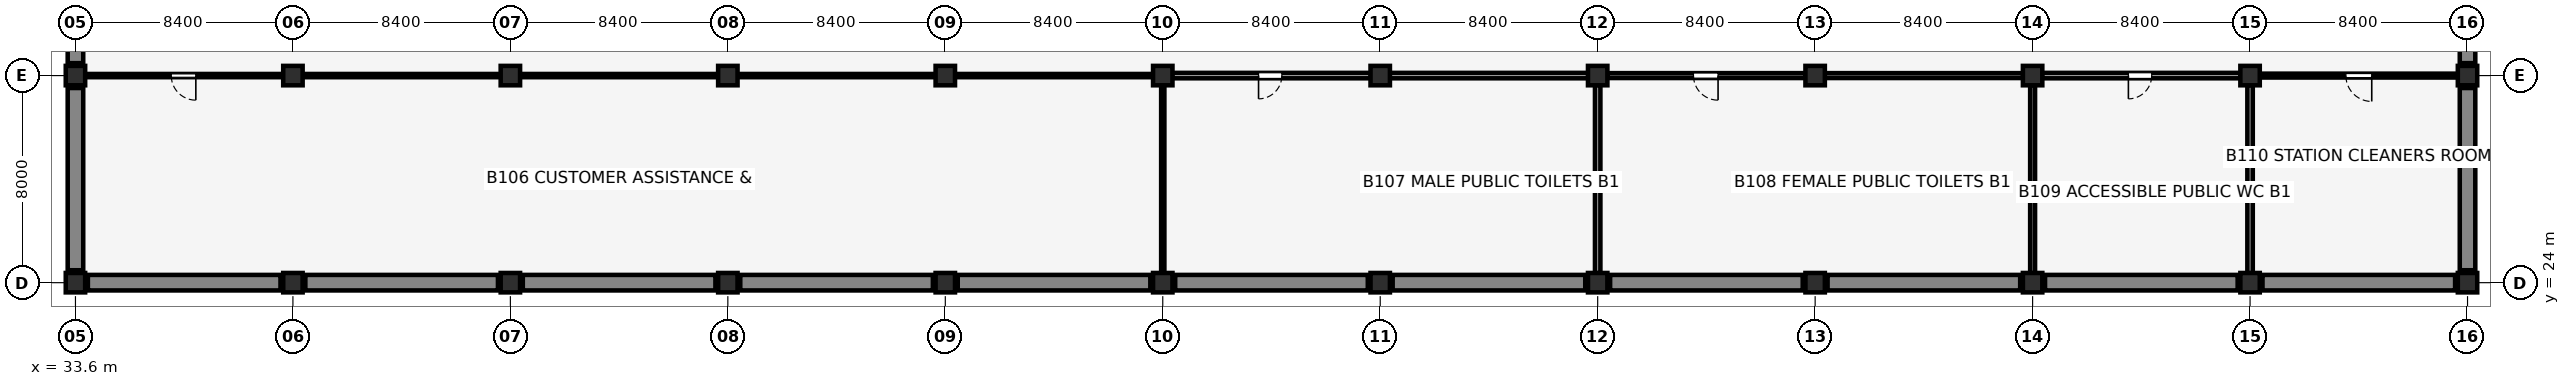
"""IFC4 building model, lengths in metres.
Left out: names, types, materials, properties, quantities, classifications, styles, units other than length and angle.
Written with IfcOpenShell. Run it as: python <this file> out.ifc"""

import sys

from ifc_helpers import new_model, si_unit, direction, frame, frame_2d, origin, origin_2d, place, context, subcontext, project, spatial, rectangle, extrude, element, fill, save


model = new_model("IFC4")
c1 = context("Model", 3, precision=1e-05, world=origin(), true_north=direction((0.0, 1.0)))
c2 = subcontext(c1, "Body", "Model", "MODEL_VIEW")
j1 = project(units=[si_unit("LENGTHUNIT", "METRE"), si_unit("PLANEANGLEUNIT", "RADIAN")], contexts=[c1])
p1 = place(None, origin())
s1 = spatial("IfcSite", under=j1, at=p1, CompositionType="ELEMENT")
p2 = place(p1, origin())
s2 = spatial("IfcBuilding", under=s1, at=p2, CompositionType="ELEMENT")
p3 = place(p2, frame((0.0, 0.0, -5.44)))
s3 = spatial("IfcBuildingStorey", under=s2, at=p3, CompositionType="ELEMENT", Elevation=-5.44)
for number, where, z_axis, x_axis in (
    (1, (34.08, 24.0, 0.0), (0.0, 0.0, 1.0), (1.0, 0.0, 0.0)),
    (2, (42.48, 24.0, 0.0), (0.0, 0.0, 1.0), (1.0, 0.0, 0.0)),
):
    element("IfcWall", number, at=place(p3, frame(where, z_axis=z_axis, x_axis=x_axis)), inside=s3, PredefinedType="SOLIDWALL", context=c2, shape_type="SweptSolid", body=[
        extrude(rectangle(XDim=7.44, YDim=0.6, at=frame_2d((3.72, 0.0))), origin(), (0.0, 0.0, 1.0), 5.02),
    ])
p4 = place(p3, frame((50.88, 24.0, 0.0), z_axis=(0.0, 0.0, 1.0), x_axis=(1.0, 0.0, 0.0)))
e3 = element("IfcWall", 3, at=p4, inside=s3, PredefinedType="SOLIDWALL", context=c2, shape_type="SweptSolid", body=[
    extrude(rectangle(XDim=7.44, YDim=0.6, at=frame_2d((3.72, 0.0))), origin(), (0.0, 0.0, 1.0), 5.02),
])
p5 = place(p3, frame((59.28, 24.0, 0.0), z_axis=(0.0, 0.0, 1.0), x_axis=(1.0, 0.0, 0.0)))
e4 = element("IfcWall", 4, at=p5, inside=s3, PredefinedType="SOLIDWALL", context=c2, shape_type="SweptSolid", body=[
    extrude(rectangle(XDim=7.44, YDim=0.6, at=frame_2d((3.72, 0.0))), origin(), (0.0, 0.0, 1.0), 5.02),
])
p6 = place(p3, frame((67.68, 24.0, 0.0), z_axis=(0.0, 0.0, 1.0), x_axis=(1.0, 0.0, 0.0)))
e5 = element("IfcWall", 5, at=p6, inside=s3, PredefinedType="SOLIDWALL", context=c2, shape_type="SweptSolid", body=[
    extrude(rectangle(XDim=7.44, YDim=0.6, at=frame_2d((3.72, 0.0))), origin(), (0.0, 0.0, 1.0), 5.02),
])
for number, where, z_axis, x_axis in (
    (6, (76.08, 24.0, 0.0), (0.0, 0.0, 1.0), (1.0, 0.0, 0.0)),
    (7, (84.48, 24.0, 0.0), (0.0, 0.0, 1.0), (1.0, 0.0, 0.0)),
):
    element("IfcWall", number, at=place(p3, frame(where, z_axis=z_axis, x_axis=x_axis)), inside=s3, PredefinedType="SOLIDWALL", context=c2, shape_type="SweptSolid", body=[
        extrude(rectangle(XDim=7.44, YDim=0.6, at=frame_2d((3.72, 0.0))), origin(), (0.0, 0.0, 1.0), 5.02),
    ])
p7 = place(p3, frame((92.88, 24.0, 0.0), z_axis=(0.0, 0.0, 1.0), x_axis=(1.0, 0.0, 0.0)))
e8 = element("IfcWall", 8, at=p7, inside=s3, PredefinedType="SOLIDWALL", context=c2, shape_type="SweptSolid", body=[
    extrude(rectangle(XDim=7.44, YDim=0.6, at=frame_2d((3.72, 0.0))), origin(), (0.0, 0.0, 1.0), 5.02),
])
p8 = place(p3, frame((101.28, 24.0, 0.0), z_axis=(0.0, 0.0, 1.0), x_axis=(1.0, 0.0, 0.0)))
e9 = element("IfcWall", 9, at=p8, inside=s3, PredefinedType="SOLIDWALL", context=c2, shape_type="SweptSolid", body=[
    extrude(rectangle(XDim=7.44, YDim=0.6, at=frame_2d((3.72, 0.0))), origin(), (0.0, 0.0, 1.0), 5.02),
])
p9 = place(p3, frame((109.68, 24.0, 0.0), z_axis=(0.0, 0.0, 1.0), x_axis=(1.0, 0.0, 0.0)))
e10 = element("IfcWall", 10, at=p9, inside=s3, PredefinedType="SOLIDWALL", context=c2, shape_type="SweptSolid", body=[
    extrude(rectangle(XDim=7.44, YDim=0.6, at=frame_2d((3.72, 0.0))), origin(), (0.0, 0.0, 1.0), 5.02),
])
p10 = place(p3, frame((118.08, 24.0, 0.0), z_axis=(0.0, 0.0, 1.0), x_axis=(1.0, 0.0, 0.0)))
e11 = element("IfcWall", 11, at=p10, inside=s3, PredefinedType="SOLIDWALL", context=c2, shape_type="SweptSolid", body=[
    extrude(rectangle(XDim=7.44, YDim=0.6, at=frame_2d((3.72, 0.0))), origin(), (0.0, 0.0, 1.0), 5.02),
])
for number, where, z_axis, x_axis in (
    (12, (33.6, 24.48, 0.0), (0.0, 0.0, 1.0), (0.0, 1.0, 0.0)),
    (13, (33.6, 32.48, 0.0), (0.0, 0.0, 1.0), (0.0, 1.0, 0.0)),
    (14, (126.0, 24.48, 0.0), (0.0, 0.0, 1.0), (0.0, 1.0, 0.0)),
    (15, (126.0, 32.48, 0.0), (0.0, 0.0, 1.0), (0.0, 1.0, 0.0)),
):
    element("IfcWall", number, at=place(p3, frame(where, z_axis=z_axis, x_axis=x_axis)), inside=s3, PredefinedType="SOLIDWALL", context=c2, shape_type="SweptSolid", body=[
        extrude(rectangle(XDim=7.04, YDim=0.6, at=frame_2d((3.52, 0.0))), origin(), (0.0, 0.0, 1.0), 5.02),
    ])
for number, where, z_axis, x_axis in (
    (16, (33.6, 24.0, 0.0), (0.0, 0.0, 1.0), (1.0, 0.0, 0.0)),
    (17, (33.6, 32.0, 0.0), (0.0, 0.0, 1.0), (1.0, 0.0, 0.0)),
    (18, (42.0, 24.0, 0.0), (0.0, 0.0, 1.0), (1.0, 0.0, 0.0)),
    (19, (42.0, 32.0, 0.0), (0.0, 0.0, 1.0), (1.0, 0.0, 0.0)),
    (20, (50.4, 24.0, 0.0), (0.0, 0.0, 1.0), (1.0, 0.0, 0.0)),
    (21, (50.4, 32.0, 0.0), (0.0, 0.0, 1.0), (1.0, 0.0, 0.0)),
    (22, (58.8, 24.0, 0.0), (0.0, 0.0, 1.0), (1.0, 0.0, 0.0)),
    (23, (58.8, 32.0, 0.0), (0.0, 0.0, 1.0), (1.0, 0.0, 0.0)),
    (24, (67.2, 24.0, 0.0), (0.0, 0.0, 1.0), (1.0, 0.0, 0.0)),
    (25, (67.2, 32.0, 0.0), (0.0, 0.0, 1.0), (1.0, 0.0, 0.0)),
    (26, (75.6, 24.0, 0.0), (0.0, 0.0, 1.0), (1.0, 0.0, 0.0)),
    (27, (75.6, 32.0, 0.0), (0.0, 0.0, 1.0), (1.0, 0.0, 0.0)),
    (28, (84.0, 24.0, 0.0), (0.0, 0.0, 1.0), (1.0, 0.0, 0.0)),
    (29, (84.0, 32.0, 0.0), (0.0, 0.0, 1.0), (1.0, 0.0, 0.0)),
    (30, (92.4, 24.0, 0.0), (0.0, 0.0, 1.0), (1.0, 0.0, 0.0)),
    (31, (92.4, 32.0, 0.0), (0.0, 0.0, 1.0), (1.0, 0.0, 0.0)),
    (32, (100.8, 24.0, 0.0), (0.0, 0.0, 1.0), (1.0, 0.0, 0.0)),
    (33, (100.8, 32.0, 0.0), (0.0, 0.0, 1.0), (1.0, 0.0, 0.0)),
    (34, (109.2, 24.0, 0.0), (0.0, 0.0, 1.0), (1.0, 0.0, 0.0)),
    (35, (109.2, 32.0, 0.0), (0.0, 0.0, 1.0), (1.0, 0.0, 0.0)),
    (36, (117.6, 24.0, 0.0), (0.0, 0.0, 1.0), (1.0, 0.0, 0.0)),
    (37, (117.6, 32.0, 0.0), (0.0, 0.0, 1.0), (1.0, 0.0, 0.0)),
    (38, (126.0, 24.0, 0.0), (0.0, 0.0, 1.0), (1.0, 0.0, 0.0)),
    (39, (126.0, 32.0, 0.0), (0.0, 0.0, 1.0), (1.0, 0.0, 0.0)),
):
    element("IfcColumn", number, at=place(p3, frame(where, z_axis=z_axis, x_axis=x_axis)), inside=s3, PredefinedType="COLUMN", context=c2, shape_type="SweptSolid", body=[
        extrude(rectangle(XDim=0.75, YDim=0.75, at=origin_2d()), origin(), (0.0, 0.0, 1.0), 5.02),
    ])
p11 = place(p3, frame((33.965, 32.0, 0.0), z_axis=(0.0, 0.0, 1.0), x_axis=(1.0, 0.0, 0.0)))
e40 = element("IfcWall", 40, at=p11, inside=s3, PredefinedType="PARTITIONING", context=c2, shape_type="SweptSolid", body=[
    extrude(rectangle(XDim=7.67, YDim=0.125, at=frame_2d((3.835, 0.0))), origin(), (0.0, 0.0, 1.0), 4.07),
])
p12 = place(p11, frame((4.285, 0.0, 0.0), z_axis=(0.0, 0.0, 1.0), x_axis=(-1.0, 0.0, 0.0)))
e41 = element("IfcOpeningElement", 41, at=p12, cuts=e40, PredefinedType="OPENING", context=c2, shape_type="SweptSolid", body=[
    extrude(rectangle(XDim=0.95, YDim=2.15, at=frame_2d((0.475, 1.075))), frame((0.0, 0.073, 0.0), z_axis=(0.0, -1.0, 0.0), x_axis=(1.0, 0.0, 0.0)), (0.0, 0.0, 1.0), 0.145),
])
p13 = place(p3, frame((75.965, 32.0, 0.0), z_axis=(0.0, 0.0, 1.0), x_axis=(1.0, 0.0, 0.0)))
e42 = element("IfcWall", 42, at=p13, inside=s3, PredefinedType="PLUMBINGWALL", context=c2, shape_type="SweptSolid", body=[
    extrude(rectangle(XDim=7.67, YDim=0.21, at=frame_2d((3.835, 0.0))), origin(), (0.0, 0.0, 1.0), 4.07),
])
p14 = place(p13, frame((4.235, 0.0, 0.0), z_axis=(0.0, 0.0, 1.0), x_axis=(-1.0, 0.0, 0.0)))
e43 = element("IfcOpeningElement", 43, at=p14, cuts=e42, PredefinedType="OPENING", context=c2, shape_type="SweptSolid", body=[
    extrude(rectangle(XDim=0.9, YDim=2.15, at=frame_2d((0.45, 1.075))), frame((0.0, 0.115, 0.0), z_axis=(0.0, -1.0, 0.0), x_axis=(1.0, 0.0, 0.0)), (0.0, 0.0, 1.0), 0.23),
])
p15 = place(p3, frame((92.765, 32.0, 0.0), z_axis=(0.0, 0.0, 1.0), x_axis=(1.0, 0.0, 0.0)))
e44 = element("IfcWall", 44, at=p15, inside=s3, PredefinedType="PLUMBINGWALL", context=c2, shape_type="SweptSolid", body=[
    extrude(rectangle(XDim=7.67, YDim=0.19, at=frame_2d((3.835, 0.0))), origin(), (0.0, 0.0, 1.0), 4.07),
])
p16 = place(p15, frame((4.285, 0.0, 0.0), z_axis=(0.0, 0.0, 1.0), x_axis=(-1.0, 0.0, 0.0)))
e45 = element("IfcOpeningElement", 45, at=p16, cuts=e44, PredefinedType="OPENING", context=c2, shape_type="SweptSolid", body=[
    extrude(rectangle(XDim=0.95, YDim=2.15, at=frame_2d((0.475, 1.075))), frame((0.0, 0.105, 0.0), z_axis=(0.0, -1.0, 0.0), x_axis=(1.0, 0.0, 0.0)), (0.0, 0.0, 1.0), 0.21),
])
p17 = place(p3, frame((109.565, 32.0, 0.0), z_axis=(0.0, 0.0, 1.0), x_axis=(1.0, 0.0, 0.0)))
e46 = element("IfcWall", 46, at=p17, inside=s3, PredefinedType="PLUMBINGWALL", context=c2, shape_type="SweptSolid", body=[
    extrude(rectangle(XDim=7.67, YDim=0.21, at=frame_2d((3.835, 0.0))), origin(), (0.0, 0.0, 1.0), 4.07),
])
p18 = place(p17, frame((4.235, 0.0, 0.0), z_axis=(0.0, 0.0, 1.0), x_axis=(-1.0, 0.0, 0.0)))
e47 = element("IfcOpeningElement", 47, at=p18, cuts=e46, PredefinedType="OPENING", context=c2, shape_type="SweptSolid", body=[
    extrude(rectangle(XDim=0.9, YDim=2.15, at=frame_2d((0.45, 1.075))), frame((0.0, 0.115, 0.0), z_axis=(0.0, -1.0, 0.0), x_axis=(1.0, 0.0, 0.0)), (0.0, 0.0, 1.0), 0.23),
])
p19 = place(p3, frame((117.965, 32.0, 0.0), z_axis=(0.0, 0.0, 1.0), x_axis=(1.0, 0.0, 0.0)))
e48 = element("IfcWall", 48, at=p19, inside=s3, PredefinedType="PARTITIONING", context=c2, shape_type="SweptSolid", body=[
    extrude(rectangle(XDim=7.67, YDim=0.15, at=frame_2d((3.835, 0.0))), origin(), (0.0, 0.0, 1.0), 4.07),
])
p20 = place(p19, frame((4.335, 0.0, 0.0), z_axis=(0.0, 0.0, 1.0), x_axis=(-1.0, 0.0, 0.0)))
e49 = element("IfcOpeningElement", 49, at=p20, cuts=e48, PredefinedType="OPENING", context=c2, shape_type="SweptSolid", body=[
    extrude(rectangle(XDim=1.0, YDim=2.15, at=frame_2d((0.5, 1.075))), frame((0.0, 0.085, 0.0), z_axis=(0.0, -1.0, 0.0), x_axis=(1.0, 0.0, 0.0)), (0.0, 0.0, 1.0), 0.17),
])
p21 = place(p3, frame((42.365, 32.0, 0.0), z_axis=(0.0, 0.0, 1.0), x_axis=(1.0, 0.0, 0.0)))
e50 = element("IfcWall", 50, at=p21, inside=s3, PredefinedType="PARTITIONING", context=c2, shape_type="SweptSolid", body=[
    extrude(rectangle(XDim=7.67, YDim=0.125, at=frame_2d((3.835, 0.0))), origin(), (0.0, 0.0, 1.0), 4.07),
])
p22 = place(p3, frame((50.765, 32.0, 0.0), z_axis=(0.0, 0.0, 1.0), x_axis=(1.0, 0.0, 0.0)))
e51 = element("IfcWall", 51, at=p22, inside=s3, PredefinedType="PARTITIONING", context=c2, shape_type="SweptSolid", body=[
    extrude(rectangle(XDim=7.67, YDim=0.125, at=frame_2d((3.835, 0.0))), origin(), (0.0, 0.0, 1.0), 4.07),
])
p23 = place(p3, frame((59.165, 32.0, 0.0), z_axis=(0.0, 0.0, 1.0), x_axis=(1.0, 0.0, 0.0)))
e52 = element("IfcWall", 52, at=p23, inside=s3, PredefinedType="PARTITIONING", context=c2, shape_type="SweptSolid", body=[
    extrude(rectangle(XDim=7.67, YDim=0.125, at=frame_2d((3.835, 0.0))), origin(), (0.0, 0.0, 1.0), 4.07),
])
p24 = place(p3, frame((67.565, 32.0, 0.0), z_axis=(0.0, 0.0, 1.0), x_axis=(1.0, 0.0, 0.0)))
e53 = element("IfcWall", 53, at=p24, inside=s3, PredefinedType="PARTITIONING", context=c2, shape_type="SweptSolid", body=[
    extrude(rectangle(XDim=7.67, YDim=0.125, at=frame_2d((3.835, 0.0))), origin(), (0.0, 0.0, 1.0), 4.07),
])
p25 = place(p3, frame((75.6, 24.365, 0.0), z_axis=(0.0, 0.0, 1.0), x_axis=(0.0, 1.0, 0.0)))
e54 = element("IfcWall", 54, at=p25, inside=s3, PredefinedType="PARTITIONING", context=c2, shape_type="SweptSolid", body=[
    extrude(rectangle(XDim=7.27, YDim=0.125, at=frame_2d((3.635, 0.0))), origin(), (0.0, 0.0, 1.0), 4.37),
])
p26 = place(p3, frame((84.365, 32.0, 0.0), z_axis=(0.0, 0.0, 1.0), x_axis=(1.0, 0.0, 0.0)))
e55 = element("IfcWall", 55, at=p26, inside=s3, PredefinedType="PLUMBINGWALL", context=c2, shape_type="SweptSolid", body=[
    extrude(rectangle(XDim=7.67, YDim=0.21, at=frame_2d((3.835, 0.0))), origin(), (0.0, 0.0, 1.0), 4.07),
])
p27 = place(p3, frame((92.4, 24.365, 0.0), z_axis=(0.0, 0.0, 1.0), x_axis=(0.0, 1.0, 0.0)))
e56 = element("IfcWall", 56, at=p27, inside=s3, PredefinedType="PLUMBINGWALL", context=c2, shape_type="SweptSolid", body=[
    extrude(rectangle(XDim=7.27, YDim=0.21, at=frame_2d((3.635, 0.0))), origin(), (0.0, 0.0, 1.0), 4.37),
])
p28 = place(p3, frame((101.165, 32.0, 0.0), z_axis=(0.0, 0.0, 1.0), x_axis=(1.0, 0.0, 0.0)))
e57 = element("IfcWall", 57, at=p28, inside=s3, PredefinedType="PLUMBINGWALL", context=c2, shape_type="SweptSolid", body=[
    extrude(rectangle(XDim=7.67, YDim=0.19, at=frame_2d((3.835, 0.0))), origin(), (0.0, 0.0, 1.0), 4.07),
])
p29 = place(p3, frame((109.2, 24.365, 0.0), z_axis=(0.0, 0.0, 1.0), x_axis=(0.0, 1.0, 0.0)))
e58 = element("IfcWall", 58, at=p29, inside=s3, PredefinedType="PLUMBINGWALL", context=c2, shape_type="SweptSolid", body=[
    extrude(rectangle(XDim=7.27, YDim=0.19, at=frame_2d((3.635, 0.0))), origin(), (0.0, 0.0, 1.0), 4.37),
])
p30 = place(p3, frame((117.6, 24.365, 0.0), z_axis=(0.0, 0.0, 1.0), x_axis=(0.0, 1.0, 0.0)))
e59 = element("IfcWall", 59, at=p30, inside=s3, PredefinedType="PLUMBINGWALL", context=c2, shape_type="SweptSolid", body=[
    extrude(rectangle(XDim=7.27, YDim=0.21, at=frame_2d((3.635, 0.0))), origin(), (0.0, 0.0, 1.0), 4.37),
])
p31 = place(p12, origin())
e60 = element("IfcDoor", 60, at=p31, inside=s3, OperationType="SINGLE_SWING_LEFT", PredefinedType="DOOR", context=c2, shape_type="SweptSolid", body=[
    extrude(rectangle(XDim=0.95, YDim=2.15, at=frame_2d((0.475, 1.075))), frame((0.0, 0.025, 0.0), z_axis=(0.0, -1.0, 0.0), x_axis=(1.0, 0.0, 0.0)), (0.0, 0.0, 1.0), 0.05),
])
fill(e41, e60)
p32 = place(p14, origin())
e61 = element("IfcDoor", 61, at=p32, inside=s3, OperationType="SINGLE_SWING_RIGHT", PredefinedType="DOOR", context=c2, shape_type="SweptSolid", body=[
    extrude(rectangle(XDim=0.9, YDim=2.15, at=frame_2d((0.45, 1.075))), frame((0.0, 0.025, 0.0), z_axis=(0.0, -1.0, 0.0), x_axis=(1.0, 0.0, 0.0)), (0.0, 0.0, 1.0), 0.05),
])
fill(e43, e61)
p33 = place(p16, origin())
e62 = element("IfcDoor", 62, at=p33, inside=s3, OperationType="SINGLE_SWING_LEFT", PredefinedType="DOOR", context=c2, shape_type="SweptSolid", body=[
    extrude(rectangle(XDim=0.95, YDim=2.15, at=frame_2d((0.475, 1.075))), frame((0.0, 0.025, 0.0), z_axis=(0.0, -1.0, 0.0), x_axis=(1.0, 0.0, 0.0)), (0.0, 0.0, 1.0), 0.05),
])
fill(e45, e62)
p34 = place(p18, origin())
e63 = element("IfcDoor", 63, at=p34, inside=s3, OperationType="SINGLE_SWING_RIGHT", PredefinedType="DOOR", context=c2, shape_type="SweptSolid", body=[
    extrude(rectangle(XDim=0.9, YDim=2.15, at=frame_2d((0.45, 1.075))), frame((0.0, 0.025, 0.0), z_axis=(0.0, -1.0, 0.0), x_axis=(1.0, 0.0, 0.0)), (0.0, 0.0, 1.0), 0.05),
])
fill(e47, e63)
p35 = place(p20, origin())
e64 = element("IfcDoor", 64, at=p35, inside=s3, OperationType="SINGLE_SWING_LEFT", PredefinedType="DOOR", context=c2, shape_type="SweptSolid", body=[
    extrude(rectangle(XDim=1.0, YDim=2.15, at=frame_2d((0.5, 1.075))), frame((0.0, 0.025, 0.0), z_axis=(0.0, -1.0, 0.0), x_axis=(1.0, 0.0, 0.0)), (0.0, 0.0, 1.0), 0.05),
])
fill(e49, e64)
save(model, sys.argv[1])
